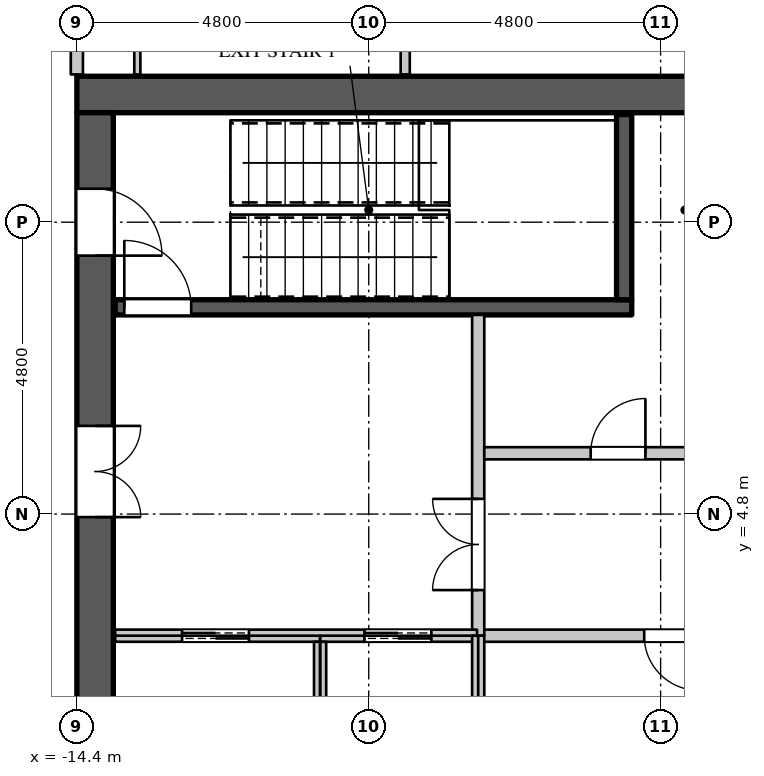
"""IFC4 building model, lengths in metres.
Left out: names, types, materials, properties, quantities, classifications, styles, units other than length and angle.
Written with IfcOpenShell. Run it as: python <this file> out.ifc"""

import sys

from ifc_helpers import new_model, si_unit, direction, frame, frame_2d, origin, place, context, subcontext, project, spatial, rectangle, extrude, element, fill, save


model = new_model("IFC4")
c1 = context("Model", 3, precision=1e-05, world=origin(), true_north=direction((0.0, 1.0)))
c2 = subcontext(c1, "Body", "Model", "MODEL_VIEW")
j1 = project(units=[si_unit("LENGTHUNIT", "METRE"), si_unit("PLANEANGLEUNIT", "RADIAN")], contexts=[c1])
p1 = place(None, origin())
s1 = spatial("IfcSite", under=j1, at=p1, CompositionType="ELEMENT")
p2 = place(p1, origin())
s2 = spatial("IfcBuilding", under=s1, at=p2, CompositionType="ELEMENT")
p3 = place(p2, frame((0.0, 0.0, 293.7)))
s3 = spatial("IfcBuildingStorey", under=s2, at=p3, CompositionType="ELEMENT", Elevation=293.7)
p4 = place(p3, frame((-14.4, 11.7, 0.0), z_axis=(0.0, 0.0, 1.0), x_axis=(1.0, 0.0, 0.0)))
e1 = element("IfcWall", 1, at=p4, inside=s3, PredefinedType="SHEAR", context=c2, shape_type="SweptSolid", body=[
    extrude(rectangle(XDim=28.8, YDim=0.6, at=frame_2d((14.4, 0.0))), origin(), (0.0, 0.0, 1.0), 4.2),
])
p5 = place(p3, frame((-14.1, -11.4, 0.0), z_axis=(0.0, 0.0, 1.0), x_axis=(0.0, 1.0, 0.0)))
e2 = element("IfcWall", 2, at=p5, inside=s3, PredefinedType="SHEAR", context=c2, shape_type="SweptSolid", body=[
    extrude(rectangle(XDim=22.8, YDim=0.6, at=frame_2d((11.4, 0.0))), origin(), (0.0, 0.0, 1.0), 4.2),
])
p6 = place(p5, frame((20.45, 0.0, 0.0)))
e3 = element("IfcOpeningElement", 3, at=p6, cuts=e2, PredefinedType="OPENING", context=c2, shape_type="SweptSolid", body=[
    extrude(rectangle(XDim=1.1, YDim=2.2, at=frame_2d((0.55, 1.1))), frame((0.0, 0.31, 0.0), z_axis=(0.0, -1.0, 0.0), x_axis=(1.0, 0.0, 0.0)), (0.0, 0.0, 1.0), 0.62),
])
p7 = place(p5, frame((1.25, 0.0, 0.0)))
e4 = element("IfcOpeningElement", 4, at=p7, cuts=e2, PredefinedType="OPENING", context=c2, shape_type="SweptSolid", body=[
    extrude(rectangle(XDim=1.1, YDim=2.2, at=frame_2d((0.55, 1.1))), frame((0.0, 0.31, 0.0), z_axis=(0.0, -1.0, 0.0), x_axis=(1.0, 0.0, 0.0)), (0.0, 0.0, 1.0), 0.62),
])
p8 = place(p5, frame((16.15, 0.0, 0.0)))
e5 = element("IfcOpeningElement", 5, at=p8, cuts=e2, PredefinedType="OPENING", context=c2, shape_type="SweptSolid", body=[
    extrude(rectangle(XDim=1.5, YDim=2.4, at=frame_2d((0.75, 1.2))), frame((0.0, 0.31, 0.0), z_axis=(0.0, -1.0, 0.0), x_axis=(1.0, 0.0, 0.0)), (0.0, 0.0, 1.0), 0.62),
])
p9 = place(p5, frame((5.15, 0.0, 0.0)))
e6 = element("IfcOpeningElement", 6, at=p9, cuts=e2, PredefinedType="OPENING", context=c2, shape_type="SweptSolid", body=[
    extrude(rectangle(XDim=1.5, YDim=2.4, at=frame_2d((0.75, 1.2))), frame((0.0, 0.31, 0.0), z_axis=(0.0, -1.0, 0.0), x_axis=(1.0, 0.0, 0.0)), (0.0, 0.0, 1.0), 0.62),
])
p10 = place(p3, frame((-14.4, 12.03, 0.0), z_axis=(0.0, 0.0, 1.0), x_axis=(0.0, 1.0, 0.0)))
e7 = element("IfcWall", 7, at=p10, inside=s3, PredefinedType="PARTITIONING", context=c2, shape_type="SweptSolid", body=[
    extrude(rectangle(XDim=2.27, YDim=0.2, at=frame_2d((1.135, 0.0))), origin(), (0.0, 0.0, 1.0), 3.95),
])
p11 = place(p3, frame((-7.82, 2.8, 0.0), z_axis=(0.0, 0.0, 1.0), x_axis=(1.0, 0.0, 0.0)))
e8 = element("IfcWall", 8, at=p11, inside=s3, PredefinedType="PARTITIONING", context=c2, shape_type="SweptSolid", body=[
    extrude(rectangle(XDim=18.24, YDim=0.2, at=frame_2d((9.12, 0.0))), origin(), (0.0, 0.0, 1.0), 3.95),
])
p12 = place(p11, frame((2.75, 0.0, 0.0)))
e9 = element("IfcOpeningElement", 9, at=p12, cuts=e8, PredefinedType="OPENING", context=c2, shape_type="SweptSolid", body=[
    extrude(rectangle(XDim=0.9, YDim=2.2, at=frame_2d((0.45, 1.1))), frame((0.0, 0.11, 0.0), z_axis=(0.0, -1.0, 0.0), x_axis=(1.0, 0.0, 0.0)), (0.0, 0.0, 1.0), 0.22),
])
p13 = place(p11, frame((9.55, 0.0, 0.0)))
e10 = element("IfcOpeningElement", 10, at=p13, cuts=e8, PredefinedType="OPENING", context=c2, shape_type="SweptSolid", body=[
    extrude(rectangle(XDim=0.9, YDim=2.2, at=frame_2d((0.45, 1.1))), frame((0.0, 0.11, 0.0), z_axis=(0.0, -1.0, 0.0), x_axis=(1.0, 0.0, 0.0)), (0.0, 0.0, 1.0), 0.22),
])
p14 = place(p11, frame((15.5, 0.0, 0.0)))
e11 = element("IfcOpeningElement", 11, at=p14, cuts=e8, PredefinedType="OPENING", context=c2, shape_type="SweptSolid", body=[
    extrude(rectangle(XDim=0.9, YDim=2.2, at=frame_2d((0.45, 1.1))), frame((0.0, 0.11, 0.0), z_axis=(0.0, -1.0, 0.0), x_axis=(1.0, 0.0, 0.0)), (0.0, 0.0, 1.0), 0.22),
])
p15 = place(p3, frame((-7.8, 2.8, 0.0), z_axis=(0.0, 0.0, 1.0), x_axis=(0.0, 1.0, 0.0)))
e12 = element("IfcWall", 12, at=p15, inside=s3, PredefinedType="PARTITIONING", context=c2, shape_type="SweptSolid", body=[
    extrude(rectangle(XDim=5.275, YDim=0.2, at=frame_2d((2.637, 0.0))), origin(), (0.0, 0.0, 1.0), 3.95),
])
p16 = place(p15, frame((0.75, 0.0, 0.0)))
e13 = element("IfcOpeningElement", 13, at=p16, cuts=e12, PredefinedType="OPENING", context=c2, shape_type="SweptSolid", body=[
    extrude(rectangle(XDim=1.5, YDim=2.4, at=frame_2d((0.75, 1.2))), frame((0.0, 0.11, 0.0), z_axis=(0.0, -1.0, 0.0), x_axis=(1.0, 0.0, 0.0)), (0.0, 0.0, 1.0), 0.22),
])
p17 = place(p3, frame((-7.7, 5.8, 0.0), z_axis=(0.0, 0.0, 1.0), x_axis=(1.0, 0.0, 0.0)))
e14 = element("IfcWall", 14, at=p17, inside=s3, PredefinedType="PARTITIONING", context=c2, shape_type="SweptSolid", body=[
    extrude(rectangle(XDim=16.72, YDim=0.2, at=frame_2d((8.36, 0.0))), origin(), (0.0, 0.0, 1.0), 3.95),
])
p18 = place(p17, frame((1.75, 0.0, 0.0)))
e15 = element("IfcOpeningElement", 15, at=p18, cuts=e14, PredefinedType="OPENING", context=c2, shape_type="SweptSolid", body=[
    extrude(rectangle(XDim=0.9, YDim=2.2, at=frame_2d((0.45, 1.1))), frame((0.0, 0.11, 0.0), z_axis=(0.0, -1.0, 0.0), x_axis=(1.0, 0.0, 0.0)), (0.0, 0.0, 1.0), 0.22),
])
p19 = place(p17, frame((6.5, 0.0, 0.0)))
e16 = element("IfcOpeningElement", 16, at=p19, cuts=e14, PredefinedType="OPENING", context=c2, shape_type="SweptSolid", body=[
    extrude(rectangle(XDim=0.9, YDim=2.2, at=frame_2d((0.45, 1.1))), frame((0.0, 0.11, 0.0), z_axis=(0.0, -1.0, 0.0), x_axis=(1.0, 0.0, 0.0)), (0.0, 0.0, 1.0), 0.22),
])
p20 = place(p17, frame((10.9, 0.0, 0.0)))
e17 = element("IfcOpeningElement", 17, at=p20, cuts=e14, PredefinedType="OPENING", context=c2, shape_type="SweptSolid", body=[
    extrude(rectangle(XDim=0.9, YDim=2.2, at=frame_2d((0.45, 1.1))), frame((0.0, 0.11, 0.0), z_axis=(0.0, -1.0, 0.0), x_axis=(1.0, 0.0, 0.0)), (0.0, 0.0, 1.0), 0.22),
])
p21 = place(p17, frame((14.35, 0.0, 0.0)))
e18 = element("IfcOpeningElement", 18, at=p21, cuts=e14, PredefinedType="OPENING", context=c2, shape_type="SweptSolid", body=[
    extrude(rectangle(XDim=0.9, YDim=2.2, at=frame_2d((0.45, 1.1))), frame((0.0, 0.11, 0.0), z_axis=(0.0, -1.0, 0.0), x_axis=(1.0, 0.0, 0.0)), (0.0, 0.0, 1.0), 0.22),
])
p22 = place(p3, frame((-9.0, 12.03, 0.0), z_axis=(0.0, 0.0, 1.0), x_axis=(0.0, 1.0, 0.0)))
e19 = element("IfcWall", 19, at=p22, inside=s3, PredefinedType="PARTITIONING", context=c2, shape_type="SweptSolid", body=[
    extrude(rectangle(XDim=6.795, YDim=0.15, at=frame_2d((3.397, 0.0))), origin(), (0.0, 0.0, 1.0), 3.95),
])
p23 = place(p3, frame((-13.77, 2.8, 0.0), z_axis=(0.0, 0.0, 1.0), x_axis=(1.0, 0.0, 0.0)))
e20 = element("IfcWall", 20, at=p23, inside=s3, PredefinedType="PARTITIONING", context=c2, shape_type="SweptSolid", body=[
    extrude(rectangle(XDim=5.95, YDim=0.2, at=frame_2d((2.975, 0.0))), origin(), (0.0, 0.0, 1.0), 3.95),
])
p24 = place(p23, frame((1.1, 0.0, 0.0)))
e21 = element("IfcOpeningElement", 21, at=p24, cuts=e20, PredefinedType="OPENING", context=c2, shape_type="SweptSolid", body=[
    extrude(rectangle(XDim=1.1, YDim=2.2, at=frame_2d((0.55, 1.1))), frame((0.0, 0.11, 0.0), z_axis=(0.0, -1.0, 0.0), x_axis=(1.0, 0.0, 0.0)), (0.0, 0.0, 1.0), 0.22),
])
p25 = place(p23, frame((4.1, 0.0, 0.0)))
e22 = element("IfcOpeningElement", 22, at=p25, cuts=e20, PredefinedType="OPENING", context=c2, shape_type="SweptSolid", body=[
    extrude(rectangle(XDim=1.1, YDim=2.2, at=frame_2d((0.55, 1.1))), frame((0.0, 0.11, 0.0), z_axis=(0.0, -1.0, 0.0), x_axis=(1.0, 0.0, 0.0)), (0.0, 0.0, 1.0), 0.22),
])
p26 = place(p3, frame((-10.4, 0.0, 0.0), z_axis=(0.0, 0.0, 1.0), x_axis=(0.0, 1.0, 0.0)))
e23 = element("IfcWall", 23, at=p26, inside=s3, PredefinedType="PARTITIONING", context=c2, shape_type="SweptSolid", body=[
    extrude(rectangle(XDim=2.7, YDim=0.2, at=frame_2d((1.35, 0.0))), origin(), (0.0, 0.0, 1.0), 3.95),
])
p27 = place(p3, frame((-7.8, 0.0, 0.0), z_axis=(0.0, 0.0, 1.0), x_axis=(0.0, 1.0, 0.0)))
e24 = element("IfcWall", 24, at=p27, inside=s3, PredefinedType="PARTITIONING", context=c2, shape_type="SweptSolid", body=[
    extrude(rectangle(XDim=2.8, YDim=0.2, at=frame_2d((1.4, 0.0))), origin(), (0.0, 0.0, 1.0), 3.95),
])
p28 = place(p3, frame((-13.77, 8.2, 0.0), z_axis=(0.0, 0.0, 1.0), x_axis=(1.0, 0.0, 0.0)))
e25 = element("IfcWall", 25, at=p28, inside=s3, PredefinedType="SHEAR", context=c2, shape_type="SweptSolid", body=[
    extrude(rectangle(XDim=8.495, YDim=0.25, at=frame_2d((4.248, 0.0))), origin(), (0.0, 0.0, 1.0), 3.95),
])
p29 = place(p28, frame((0.15, 0.0, 0.0)))
e26 = element("IfcOpeningElement", 26, at=p29, cuts=e25, PredefinedType="OPENING", context=c2, shape_type="SweptSolid", body=[
    extrude(rectangle(XDim=1.1, YDim=2.2, at=frame_2d((0.55, 1.1))), frame((0.0, 0.135, 0.0), z_axis=(0.0, -1.0, 0.0), x_axis=(1.0, 0.0, 0.0)), (0.0, 0.0, 1.0), 0.27),
])
p30 = place(p3, frame((-5.4, 8.325, 0.0), z_axis=(0.0, 0.0, 1.0), x_axis=(0.0, 1.0, 0.0)))
e27 = element("IfcWall", 27, at=p30, inside=s3, PredefinedType="SHEAR", context=c2, shape_type="SweptSolid", body=[
    extrude(rectangle(XDim=3.045, YDim=0.25, at=frame_2d((1.522, 0.0))), origin(), (0.0, 0.0, 1.0), 3.95),
])
p31 = place(p3, frame((-13.406, 12.03, 0.0), z_axis=(0.0, 0.0, 1.0), x_axis=(0.0, 1.0, 0.0)))
e28 = element("IfcWall", 28, at=p31, inside=s3, PredefinedType="PARTITIONING", context=c2, shape_type="SweptSolid", body=[
    extrude(rectangle(XDim=4.57, YDim=0.1, at=frame_2d((2.285, 0.0))), origin(), (0.0, 0.0, 1.0), 3.3),
])
p32 = place(p18, origin())
e29 = element("IfcDoor", 29, at=p32, inside=s3, OperationType="SINGLE_SWING_RIGHT", PredefinedType="DOOR", context=c2, shape_type="SweptSolid", body=[
    extrude(rectangle(XDim=0.9, YDim=2.2, at=frame_2d((0.45, 1.1))), frame((0.0, 0.025, 0.0), z_axis=(0.0, -1.0, 0.0), x_axis=(1.0, 0.0, 0.0)), (0.0, 0.0, 1.0), 0.05),
])
fill(e15, e29)
p33 = place(p12, origin())
e30 = element("IfcDoor", 30, at=p33, inside=s3, OperationType="SINGLE_SWING_LEFT", PredefinedType="DOOR", context=c2, shape_type="SweptSolid", body=[
    extrude(rectangle(XDim=0.9, YDim=2.2, at=frame_2d((0.45, 1.1))), frame((0.0, 0.025, 0.0), z_axis=(0.0, -1.0, 0.0), x_axis=(1.0, 0.0, 0.0)), (0.0, 0.0, 1.0), 0.05),
])
fill(e9, e30)
p34 = place(p24, origin())
e31 = element("IfcDoor", 31, at=p34, inside=s3, OperationType="DOUBLE_DOOR_SLIDING", PredefinedType="DOOR", context=c2, shape_type="SweptSolid", body=[
    extrude(rectangle(XDim=1.1, YDim=2.2, at=frame_2d((0.55, 1.1))), frame((0.0, 0.025, 0.0), z_axis=(0.0, -1.0, 0.0), x_axis=(1.0, 0.0, 0.0)), (0.0, 0.0, 1.0), 0.05),
])
fill(e21, e31)
p35 = place(p25, origin())
e32 = element("IfcDoor", 32, at=p35, inside=s3, OperationType="DOUBLE_DOOR_SLIDING", PredefinedType="DOOR", context=c2, shape_type="SweptSolid", body=[
    extrude(rectangle(XDim=1.1, YDim=2.2, at=frame_2d((0.55, 1.1))), frame((0.0, 0.025, 0.0), z_axis=(0.0, -1.0, 0.0), x_axis=(1.0, 0.0, 0.0)), (0.0, 0.0, 1.0), 0.05),
])
fill(e22, e32)
p36 = place(p29, origin())
e33 = element("IfcDoor", 33, at=p36, inside=s3, OperationType="SINGLE_SWING_LEFT", PredefinedType="DOOR", context=c2, shape_type="SweptSolid", body=[
    extrude(rectangle(XDim=1.1, YDim=2.2, at=frame_2d((0.55, 1.1))), frame((0.0, 0.025, 0.0), z_axis=(0.0, -1.0, 0.0), x_axis=(1.0, 0.0, 0.0)), (0.0, 0.0, 1.0), 0.05),
])
fill(e26, e33)
p37 = place(p16, origin())
e34 = element("IfcDoor", 34, at=p37, inside=s3, OperationType="DOUBLE_DOOR_SINGLE_SWING", PredefinedType="DOOR", context=c2, shape_type="SweptSolid", body=[
    extrude(rectangle(XDim=1.5, YDim=2.4, at=frame_2d((0.75, 1.2))), frame((0.0, 0.025, 0.0), z_axis=(0.0, -1.0, 0.0), x_axis=(1.0, 0.0, 0.0)), (0.0, 0.0, 1.0), 0.05),
])
fill(e13, e34)
p38 = place(p6, origin())
e35 = element("IfcDoor", 35, at=p38, inside=s3, OperationType="SINGLE_SWING_RIGHT", PredefinedType="DOOR", context=c2, shape_type="SweptSolid", body=[
    extrude(rectangle(XDim=1.1, YDim=2.2, at=frame_2d((0.55, 1.1))), frame((0.0, -0.245, 0.0), z_axis=(0.0, -1.0, 0.0), x_axis=(1.0, 0.0, 0.0)), (0.0, 0.0, 1.0), 0.05),
])
fill(e3, e35)
p39 = place(p8, origin())
e36 = element("IfcDoor", 36, at=p39, inside=s3, OperationType="DOUBLE_DOOR_SINGLE_SWING", PredefinedType="DOOR", context=c2, shape_type="SweptSolid", body=[
    extrude(rectangle(XDim=1.5, YDim=2.4, at=frame_2d((0.75, 1.2))), frame((0.0, -0.245, 0.0), z_axis=(0.0, -1.0, 0.0), x_axis=(1.0, 0.0, 0.0)), (0.0, 0.0, 1.0), 0.05),
])
fill(e5, e36)
save(model, sys.argv[1])
